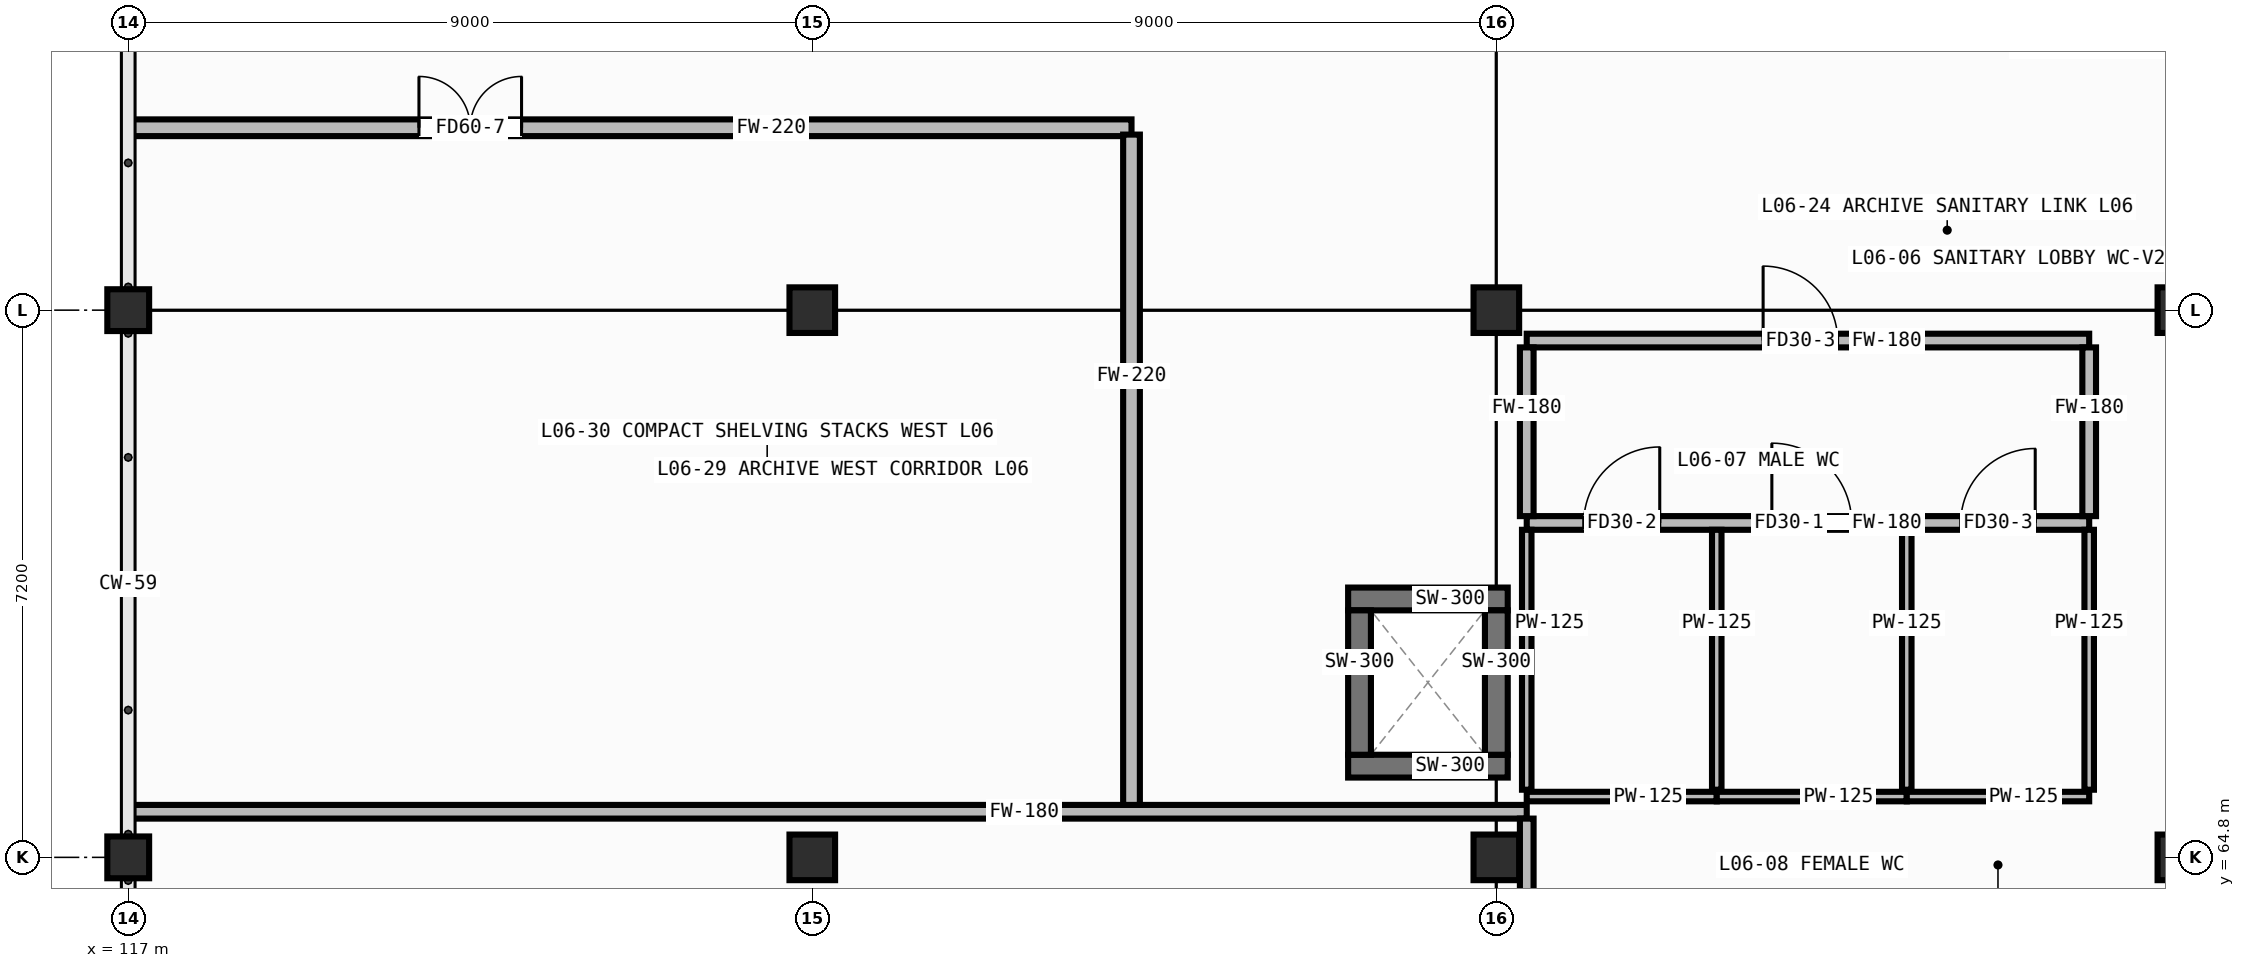
"""IFC4 building model, lengths in metres.
Left out: names, types, materials, properties, quantities, classifications, styles, units other than length and angle.
Written with IfcOpenShell. Run it as: python <this file> out.ifc"""

import sys

from ifc_helpers import new_model, si_unit, direction, frame, frame_2d, origin, origin_2d, place, context, subcontext, project, spatial, rectangle, hollow_rectangle, extrude, element, fill, save


model = new_model("IFC4")
c1 = context("Model", 3, precision=1e-05, world=origin(), true_north=direction((0.0, 1.0)))
c2 = subcontext(c1, "Body", "Model", "MODEL_VIEW")
j1 = project(units=[si_unit("LENGTHUNIT", "METRE"), si_unit("PLANEANGLEUNIT", "RADIAN")], contexts=[c1])
p1 = place(None, origin())
s1 = spatial("IfcSite", under=j1, at=p1, CompositionType="ELEMENT")
p2 = place(p1, origin())
s2 = spatial("IfcBuilding", under=s1, at=p2, CompositionType="ELEMENT")
p3 = place(p2, frame((0.0, 0.0, 20.6)))
s3 = spatial("IfcBuildingStorey", under=s2, at=p3, CompositionType="ELEMENT", Elevation=20.6)
for number, where, z_axis, x_axis in (
    (1, (117.0, 64.8, 0.0), (0.0, 0.0, 1.0), (1.0, 0.0, 0.0)),
    (2, (117.0, 72.0, 0.0), (0.0, 0.0, 1.0), (1.0, 0.0, 0.0)),
):
    element("IfcColumn", number, at=place(p3, frame(where, z_axis=z_axis, x_axis=x_axis)), inside=s3, PredefinedType="COLUMN", context=c2, shape_type="SweptSolid", body=[
        extrude(hollow_rectangle(XDim=0.55, YDim=0.55, WallThickness=0.022, at=origin_2d()), origin(), (0.0, 0.0, 1.0), 3.36),
    ])
for number, where, z_axis, x_axis in (
    (3, (126.0, 64.8, 0.0), (0.0, 0.0, 1.0), (1.0, 0.0, 0.0)),
    (4, (126.0, 72.0, 0.0), (0.0, 0.0, 1.0), (1.0, 0.0, 0.0)),
    (5, (135.0, 64.8, 0.0), (0.0, 0.0, 1.0), (1.0, 0.0, 0.0)),
    (6, (135.0, 72.0, 0.0), (0.0, 0.0, 1.0), (1.0, 0.0, 0.0)),
    (7, (144.0, 64.8, 0.0), (0.0, 0.0, 1.0), (1.0, 0.0, 0.0)),
    (8, (144.0, 72.0, 0.0), (0.0, 0.0, 1.0), (1.0, 0.0, 0.0)),
):
    element("IfcColumn", number, at=place(p3, frame(where, z_axis=z_axis, x_axis=x_axis)), inside=s3, PredefinedType="COLUMN", context=c2, shape_type="SweptSolid", body=[
        extrude(hollow_rectangle(XDim=0.6, YDim=0.6, WallThickness=0.025, at=origin_2d()), origin(), (0.0, 0.0, 1.0), 3.6),
    ])
for number, where, z_axis, x_axis in (
    (9, (133.05, 66.0, 0.0), (0.0, 0.0, 1.0), (1.0, 0.0, 0.0)),
    (10, (133.05, 68.2, 0.0), (0.0, 0.0, 1.0), (1.0, 0.0, 0.0)),
):
    element("IfcWall", number, at=place(p3, frame(where, z_axis=z_axis, x_axis=x_axis)), inside=s3, PredefinedType="SHEAR", context=c2, shape_type="SweptSolid", body=[
        extrude(rectangle(XDim=2.1, YDim=0.3, at=frame_2d((1.05, 0.0))), origin(), (0.0, 0.0, 1.0), 3.32),
    ])
for number, where, z_axis, x_axis in (
    (11, (133.2, 66.15, 0.0), (0.0, 0.0, 1.0), (0.0, 1.0, 0.0)),
    (12, (135.0, 66.15, 0.0), (0.0, 0.0, 1.0), (0.0, 1.0, 0.0)),
):
    element("IfcWall", number, at=place(p3, frame(where, z_axis=z_axis, x_axis=x_axis)), inside=s3, PredefinedType="SHEAR", context=c2, shape_type="SweptSolid", body=[
        extrude(rectangle(XDim=1.9, YDim=0.3, at=frame_2d((0.95, 0.0))), origin(), (0.0, 0.0, 1.0), 3.32),
    ])
p4 = place(p3, frame((135.4, 69.2, 0.0), z_axis=(0.0, 0.0, 1.0), x_axis=(1.0, 0.0, 0.0)))
e13 = element("IfcWall", 13, at=p4, inside=s3, PredefinedType="PARTITIONING", context=c2, shape_type="SweptSolid", body=[
    extrude(rectangle(XDim=7.4, YDim=0.18, at=frame_2d((3.7, 0.0))), origin(), (0.0, 0.0, 1.0), 3.32),
])
p5 = place(p4, frame((0.75, 0.0, 0.0)))
e14 = element("IfcOpeningElement", 14, at=p5, cuts=e13, PredefinedType="OPENING", context=c2, shape_type="SweptSolid", body=[
    extrude(rectangle(XDim=1.0, YDim=2.08, at=frame_2d((0.5, 1.04))), frame((0.0, 0.102, 0.0), z_axis=(0.0, -1.0, 0.0), x_axis=(1.0, 0.0, 0.0)), (0.0, 0.0, 1.0), 0.204),
])
p6 = place(p4, frame((3.225, 0.0, 0.0)))
e15 = element("IfcOpeningElement", 15, at=p6, cuts=e13, PredefinedType="OPENING", context=c2, shape_type="SweptSolid", body=[
    extrude(rectangle(XDim=1.05, YDim=2.1, at=frame_2d((0.525, 1.05))), frame((0.0, 0.102, 0.0), z_axis=(0.0, -1.0, 0.0), x_axis=(1.0, 0.0, 0.0)), (0.0, 0.0, 1.0), 0.204),
])
p7 = place(p4, frame((5.71, 0.0, 0.0)))
e16 = element("IfcOpeningElement", 16, at=p7, cuts=e13, PredefinedType="OPENING", context=c2, shape_type="SweptSolid", body=[
    extrude(rectangle(XDim=0.98, YDim=2.02, at=frame_2d((0.49, 1.01))), frame((0.0, 0.102, 0.0), z_axis=(0.0, -1.0, 0.0), x_axis=(1.0, 0.0, 0.0)), (0.0, 0.0, 1.0), 0.204),
])
p8 = place(p3, frame((135.4, 71.6, 0.0), z_axis=(0.0, 0.0, 1.0), x_axis=(1.0, 0.0, 0.0)))
e17 = element("IfcWall", 17, at=p8, inside=s3, PredefinedType="PARTITIONING", context=c2, shape_type="SweptSolid", body=[
    extrude(rectangle(XDim=7.4, YDim=0.18, at=frame_2d((3.7, 0.0))), origin(), (0.0, 0.0, 1.0), 3.32),
])
p9 = place(p8, frame((3.11, 0.0, 0.0)))
e18 = element("IfcOpeningElement", 18, at=p9, cuts=e17, PredefinedType="OPENING", context=c2, shape_type="SweptSolid", body=[
    extrude(rectangle(XDim=0.98, YDim=2.02, at=frame_2d((0.49, 1.01))), frame((0.0, 0.102, 0.0), z_axis=(0.0, -1.0, 0.0), x_axis=(1.0, 0.0, 0.0)), (0.0, 0.0, 1.0), 0.204),
])
for number, where, z_axis, x_axis in (
    (19, (135.4, 69.29, 0.0), (0.0, 0.0, 1.0), (0.0, 1.0, 0.0)),
    (20, (142.8, 69.29, 0.0), (0.0, 0.0, 1.0), (0.0, 1.0, 0.0)),
):
    element("IfcWall", number, at=place(p3, frame(where, z_axis=z_axis, x_axis=x_axis)), inside=s3, PredefinedType="PARTITIONING", context=c2, shape_type="SweptSolid", body=[
        extrude(rectangle(XDim=2.22, YDim=0.18, at=frame_2d((1.11, 0.0))), origin(), (0.0, 0.0, 1.0), 3.32),
    ])
p10 = place(p3, frame((135.4, 65.6, 0.0), z_axis=(0.0, 0.0, 1.0), x_axis=(1.0, 0.0, 0.0)))
e21 = element("IfcWall", 21, at=p10, inside=s3, PredefinedType="PARTITIONING", context=c2, shape_type="SweptSolid", body=[
    extrude(rectangle(XDim=2.5, YDim=0.125, at=frame_2d((1.25, 0.0))), origin(), (0.0, 0.0, 1.0), 3.32),
])
for number, where, z_axis, x_axis in (
    (22, (135.4, 65.69, 0.0), (0.0, 0.0, 1.0), (0.0, 1.0, 0.0)),
    (23, (137.9, 65.69, 0.0), (0.0, 0.0, 1.0), (0.0, 1.0, 0.0)),
):
    element("IfcWall", number, at=place(p3, frame(where, z_axis=z_axis, x_axis=x_axis)), inside=s3, PredefinedType="PARTITIONING", context=c2, shape_type="SweptSolid", body=[
        extrude(rectangle(XDim=3.42, YDim=0.125, at=frame_2d((1.71, 0.0))), origin(), (0.0, 0.0, 1.0), 3.32),
    ])
p11 = place(p3, frame((137.9, 65.6, 0.0), z_axis=(0.0, 0.0, 1.0), x_axis=(1.0, 0.0, 0.0)))
e24 = element("IfcWall", 24, at=p11, inside=s3, PredefinedType="PARTITIONING", context=c2, shape_type="SweptSolid", body=[
    extrude(rectangle(XDim=2.5, YDim=0.125, at=frame_2d((1.25, 0.0))), origin(), (0.0, 0.0, 1.0), 3.32),
])
p12 = place(p3, frame((140.4, 65.69, 0.0), z_axis=(0.0, 0.0, 1.0), x_axis=(0.0, 1.0, 0.0)))
e25 = element("IfcWall", 25, at=p12, inside=s3, PredefinedType="PARTITIONING", context=c2, shape_type="SweptSolid", body=[
    extrude(rectangle(XDim=3.42, YDim=0.125, at=frame_2d((1.71, 0.0))), origin(), (0.0, 0.0, 1.0), 3.32),
])
p13 = place(p3, frame((140.4, 65.6, 0.0), z_axis=(0.0, 0.0, 1.0), x_axis=(1.0, 0.0, 0.0)))
e26 = element("IfcWall", 26, at=p13, inside=s3, PredefinedType="PARTITIONING", context=c2, shape_type="SweptSolid", body=[
    extrude(rectangle(XDim=2.4, YDim=0.125, at=frame_2d((1.2, 0.0))), origin(), (0.0, 0.0, 1.0), 3.32),
])
p14 = place(p3, frame((142.8, 65.69, 0.0), z_axis=(0.0, 0.0, 1.0), x_axis=(0.0, 1.0, 0.0)))
e27 = element("IfcWall", 27, at=p14, inside=s3, PredefinedType="PARTITIONING", context=c2, shape_type="SweptSolid", body=[
    extrude(rectangle(XDim=3.42, YDim=0.125, at=frame_2d((1.71, 0.0))), origin(), (0.0, 0.0, 1.0), 3.32),
])
p15 = place(p3, frame((117.035, 65.4, 0.0), z_axis=(0.0, 0.0, 1.0), x_axis=(1.0, 0.0, 0.0)))
e28 = element("IfcWall", 28, at=p15, inside=s3, PredefinedType="PARTITIONING", context=c2, shape_type="SweptSolid", body=[
    extrude(rectangle(XDim=18.365, YDim=0.18, at=frame_2d((9.183, 0.0))), origin(), (0.0, 0.0, 1.0), 3.32),
])
p16 = place(p3, frame((135.4, 57.635, 0.0), z_axis=(0.0, 0.0, 1.0), x_axis=(0.0, 1.0, 0.0)))
e29 = element("IfcWall", 29, at=p16, inside=s3, PredefinedType="PARTITIONING", context=c2, shape_type="SweptSolid", body=[
    extrude(rectangle(XDim=7.675, YDim=0.18, at=frame_2d((3.837, 0.0))), origin(), (0.0, 0.0, 1.0), 3.32),
])
p17 = place(p16, frame((3.14, 0.0, 0.0)))
e30 = element("IfcOpeningElement", 30, at=p17, cuts=e29, PredefinedType="OPENING", context=c2, shape_type="SweptSolid", body=[
    extrude(rectangle(XDim=1.45, YDim=2.1, at=frame_2d((0.725, 1.05))), frame((0.0, 0.102, 0.0), z_axis=(0.0, -1.0, 0.0), x_axis=(1.0, 0.0, 0.0)), (0.0, 0.0, 1.0), 0.204),
])
p18 = place(p3, frame((117.035, 74.4, 0.0), z_axis=(0.0, 0.0, 1.0), x_axis=(1.0, 0.0, 0.0)))
e31 = element("IfcWall", 31, at=p18, inside=s3, PredefinedType="PARTITIONING", context=c2, shape_type="SweptSolid", body=[
    extrude(rectangle(XDim=13.165, YDim=0.22, at=frame_2d((6.583, 0.0))), origin(), (0.0, 0.0, 1.0), 3.36),
])
p19 = place(p18, frame((3.79, 0.0, 0.0)))
e32 = element("IfcOpeningElement", 32, at=p19, cuts=e31, PredefinedType="OPENING", context=c2, shape_type="SweptSolid", body=[
    extrude(rectangle(XDim=1.35, YDim=2.08, at=frame_2d((0.675, 1.04))), frame((0.0, 0.122, 0.0), z_axis=(0.0, -1.0, 0.0), x_axis=(1.0, 0.0, 0.0)), (0.0, 0.0, 1.0), 0.244),
])
p20 = place(p3, frame((130.2, 65.49, 0.0), z_axis=(0.0, 0.0, 1.0), x_axis=(0.0, 1.0, 0.0)))
e33 = element("IfcWall", 33, at=p20, inside=s3, PredefinedType="PARTITIONING", context=c2, shape_type="SweptSolid", body=[
    extrude(rectangle(XDim=8.82, YDim=0.22, at=frame_2d((4.41, 0.0))), origin(), (0.0, 0.0, 1.0), 3.32),
])
p21 = place(p9, origin())
e34 = element("IfcDoor", 34, at=p21, inside=s3, OperationType="SINGLE_SWING_LEFT", PredefinedType="DOOR", context=c2, shape_type="SweptSolid", body=[
    extrude(rectangle(XDim=0.98, YDim=2.02, at=frame_2d((0.49, 1.01))), frame((0.0, 0.025, 0.0), z_axis=(0.0, -1.0, 0.0), x_axis=(1.0, 0.0, 0.0)), (0.0, 0.0, 1.0), 0.05),
])
fill(e18, e34)
p22 = place(p5, origin())
e35 = element("IfcDoor", 35, at=p22, inside=s3, OperationType="SINGLE_SWING_RIGHT", PredefinedType="DOOR", context=c2, shape_type="SweptSolid", body=[
    extrude(rectangle(XDim=1.0, YDim=2.08, at=frame_2d((0.5, 1.04))), frame((0.0, 0.025, 0.0), z_axis=(0.0, -1.0, 0.0), x_axis=(1.0, 0.0, 0.0)), (0.0, 0.0, 1.0), 0.05),
])
fill(e14, e35)
p23 = place(p6, origin())
e36 = element("IfcDoor", 36, at=p23, inside=s3, OperationType="SINGLE_SWING_LEFT", PredefinedType="DOOR", context=c2, shape_type="SweptSolid", body=[
    extrude(rectangle(XDim=1.05, YDim=2.1, at=frame_2d((0.525, 1.05))), frame((0.0, 0.025, 0.0), z_axis=(0.0, -1.0, 0.0), x_axis=(1.0, 0.0, 0.0)), (0.0, 0.0, 1.0), 0.05),
])
fill(e15, e36)
p24 = place(p7, origin())
e37 = element("IfcDoor", 37, at=p24, inside=s3, OperationType="SINGLE_SWING_RIGHT", PredefinedType="DOOR", context=c2, shape_type="SweptSolid", body=[
    extrude(rectangle(XDim=0.98, YDim=2.02, at=frame_2d((0.49, 1.01))), frame((0.0, 0.025, 0.0), z_axis=(0.0, -1.0, 0.0), x_axis=(1.0, 0.0, 0.0)), (0.0, 0.0, 1.0), 0.05),
])
fill(e16, e37)
p25 = place(p19, origin())
e38 = element("IfcDoor", 38, at=p25, inside=s3, OperationType="DOUBLE_DOOR_SINGLE_SWING", PredefinedType="DOOR", context=c2, shape_type="SweptSolid", body=[
    extrude(rectangle(XDim=1.35, YDim=2.08, at=frame_2d((0.675, 1.04))), frame((0.0, 0.025, 0.0), z_axis=(0.0, -1.0, 0.0), x_axis=(1.0, 0.0, 0.0)), (0.0, 0.0, 1.0), 0.05),
])
fill(e32, e38)
save(model, sys.argv[1])
